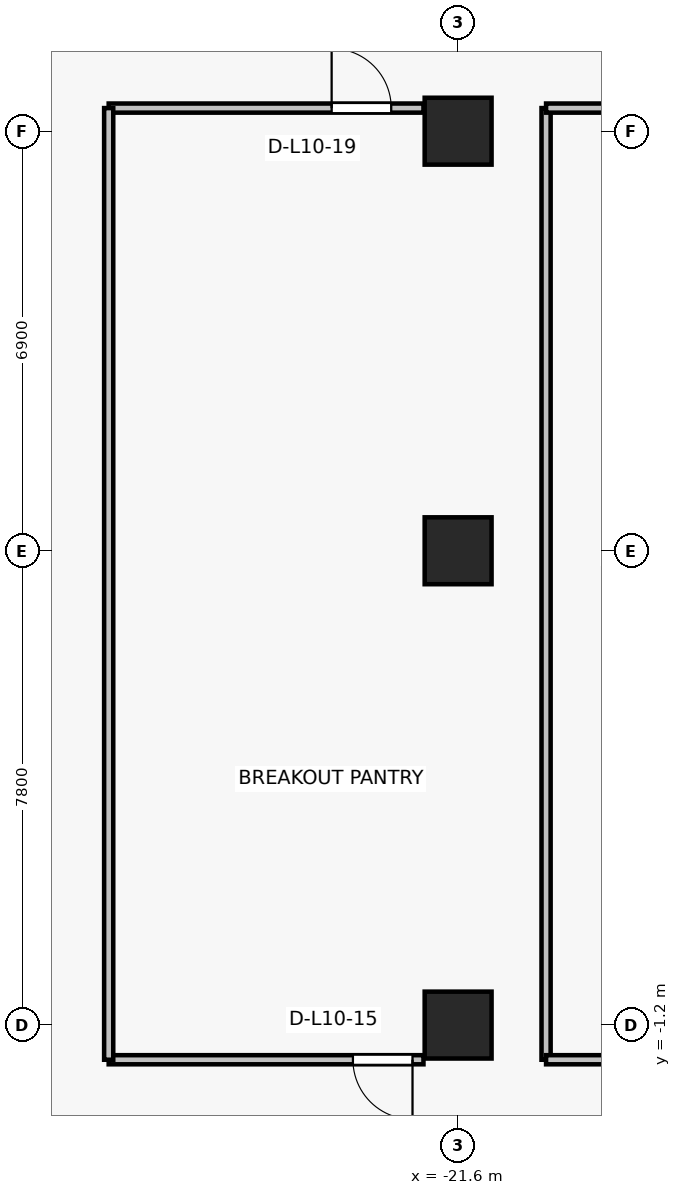
"""IFC4 building model, lengths in metres.
Left out: names, types, materials, properties, quantities, classifications, styles, units other than length and angle.
Written with IfcOpenShell. Run it as: python <this file> out.ifc"""

import sys

from ifc_helpers import new_model, si_unit, direction, frame, frame_2d, origin, origin_2d, place, context, subcontext, project, spatial, rectangle, extrude, source, transform, mapped, element, fill, save


model = new_model("IFC4")
c1 = context("Model", 3, precision=1e-05, world=origin(), true_north=direction((0.0, 1.0)))
c2 = subcontext(c1, "Body", "Model", "MODEL_VIEW")
j1 = project(units=[si_unit("LENGTHUNIT", "METRE"), si_unit("PLANEANGLEUNIT", "RADIAN")], contexts=[c1])
p1 = place(None, origin())
s1 = spatial("IfcSite", under=j1, at=p1, CompositionType="ELEMENT")
p2 = place(p1, origin())
s2 = spatial("IfcBuilding", under=s1, at=p2, CompositionType="ELEMENT")
p3 = place(p2, frame((0.0, 0.0, 40.6)))
s3 = spatial("IfcBuildingStorey", under=s2, at=p3, CompositionType="ELEMENT", Elevation=40.6)
for number, where, z_axis, x_axis in (
    (1, (-21.6, -1.2, 0.0), (0.0, 0.0, 1.0), (1.0, 0.0, 0.0)),
    (2, (-21.6, 6.6, 0.0), (0.0, 0.0, 1.0), (1.0, 0.0, 0.0)),
    (3, (-21.6, 13.5, 0.0), (0.0, 0.0, 1.0), (1.0, 0.0, 0.0)),
):
    element("IfcColumn", number, at=place(p3, frame(where, z_axis=z_axis, x_axis=x_axis)), inside=s3, PredefinedType="COLUMN", context=c2, shape_type="SweptSolid", body=[
        extrude(rectangle(XDim=1.1, YDim=1.1, at=origin_2d()), origin(), (0.0, 0.0, 1.0), 3.3),
    ])
p4 = place(p3, frame((-22.17, -1.77, 0.0), z_axis=(0.0, 0.0, 1.0), x_axis=(-1.0, 0.0, 0.0)))
e4 = element("IfcWall", 4, at=p4, inside=s3, PredefinedType="PARTITIONING", context=c2, shape_type="SweptSolid", body=[
    extrude(rectangle(XDim=5.177, YDim=0.15, at=frame_2d((2.588, 0.0))), origin(), (0.0, 0.0, 1.0), 3.075),
])
p5 = place(p4, frame((0.18, 0.0, 0.0)))
e5 = element("IfcOpeningElement", 5, at=p5, cuts=e4, PredefinedType="OPENING", context=c2, shape_type="SweptSolid", body=[
    extrude(rectangle(XDim=0.98, YDim=2.15, at=frame_2d((0.49, 1.075))), frame((0.0, 0.085, 0.0), z_axis=(0.0, -1.0, 0.0), x_axis=(1.0, 0.0, 0.0)), (0.0, 0.0, 1.0), 0.17),
])
p6 = place(p3, frame((-27.346, 13.88, 0.0), z_axis=(0.0, 0.0, 1.0), x_axis=(1.0, 0.0, 0.0)))
e6 = element("IfcWall", 6, at=p6, inside=s3, PredefinedType="PARTITIONING", context=c2, shape_type="SweptSolid", body=[
    extrude(rectangle(XDim=5.177, YDim=0.15, at=frame_2d((2.588, 0.0))), origin(), (0.0, 0.0, 1.0), 3.075),
])
p7 = place(p6, frame((3.667, 0.0, 0.0)))
e7 = element("IfcOpeningElement", 7, at=p7, cuts=e6, PredefinedType="OPENING", context=c2, shape_type="SweptSolid", body=[
    extrude(rectangle(XDim=0.98, YDim=2.15, at=frame_2d((0.49, 1.075))), frame((0.0, 0.085, 0.0), z_axis=(0.0, -1.0, 0.0), x_axis=(1.0, 0.0, 0.0)), (0.0, 0.0, 1.0), 0.17),
])
for number, where, z_axis, x_axis in (
    (8, (-27.346, -1.77, 0.0), (0.0, 0.0, 1.0), (0.0, 1.0, 0.0)),
    (9, (-20.154, 13.88, 0.0), (0.0, 0.0, 1.0), (0.0, -1.0, 0.0)),
):
    element("IfcWall", number, at=place(p3, frame(where, z_axis=z_axis, x_axis=x_axis)), inside=s3, PredefinedType="PARTITIONING", context=c2, shape_type="SweptSolid", body=[
        extrude(rectangle(XDim=15.65, YDim=0.15, at=frame_2d((7.825, 0.0))), origin(), (0.0, 0.0, 1.0), 2.465),
    ])
p8 = place(p3, frame((-15.02, -1.77, 0.0), z_axis=(0.0, 0.0, 1.0), x_axis=(-1.0, 0.0, 0.0)))
e10 = element("IfcWall", 10, at=p8, inside=s3, PredefinedType="PARTITIONING", context=c2, shape_type="SweptSolid", body=[
    extrude(rectangle(XDim=5.134, YDim=0.15, at=frame_2d((2.567, 0.0))), origin(), (0.0, 0.0, 1.0), 3.075),
])
p9 = place(p8, frame((2.052, 0.0, 0.0)))
e11 = element("IfcOpeningElement", 11, at=p9, cuts=e10, PredefinedType="OPENING", context=c2, shape_type="SweptSolid", body=[
    extrude(rectangle(XDim=0.98, YDim=2.15, at=frame_2d((0.49, 1.075))), frame((0.0, 0.085, 0.0), z_axis=(0.0, -1.0, 0.0), x_axis=(1.0, 0.0, 0.0)), (0.0, 0.0, 1.0), 0.17),
])
p10 = place(p3, frame((-20.154, 13.88, 0.0), z_axis=(0.0, 0.0, 1.0), x_axis=(1.0, 0.0, 0.0)))
e12 = element("IfcWall", 12, at=p10, inside=s3, PredefinedType="PARTITIONING", context=c2, shape_type="SweptSolid", body=[
    extrude(rectangle(XDim=5.134, YDim=0.15, at=frame_2d((2.567, 0.0))), origin(), (0.0, 0.0, 1.0), 3.075),
])
m1 = source(origin(), c2, "Body", "SweptSolid", [
    extrude(rectangle(XDim=0.98, YDim=2.15, at=frame_2d((0.49, 1.075))), frame((0.0, 0.025, 0.0), z_axis=(0.0, -1.0, 0.0), x_axis=(1.0, 0.0, 0.0)), (0.0, 0.0, 1.0), 0.05),
])
p11 = place(p5, origin())
e13 = element("IfcDoor", 13, at=p11, inside=s3, OperationType="SINGLE_SWING_LEFT", PredefinedType="DOOR", context=c2, shape_type="MappedRepresentation", body=[
    mapped(m1, transform((0.0, 0.0, 0.0), x_axis=(1.0, 0.0, 0.0), y_axis=(0.0, 1.0, 0.0), z_axis=(0.0, 0.0, 1.0), scale=1.0)),
])
fill(e5, e13)
p12 = place(p7, origin())
e14 = element("IfcDoor", 14, at=p12, inside=s3, OperationType="SINGLE_SWING_LEFT", PredefinedType="DOOR", context=c2, shape_type="MappedRepresentation", body=[
    mapped(m1, transform((0.0, 0.0, 0.0), x_axis=(1.0, 0.0, 0.0), y_axis=(0.0, 1.0, 0.0), z_axis=(0.0, 0.0, 1.0), scale=1.0)),
])
fill(e7, e14)
save(model, sys.argv[1])
